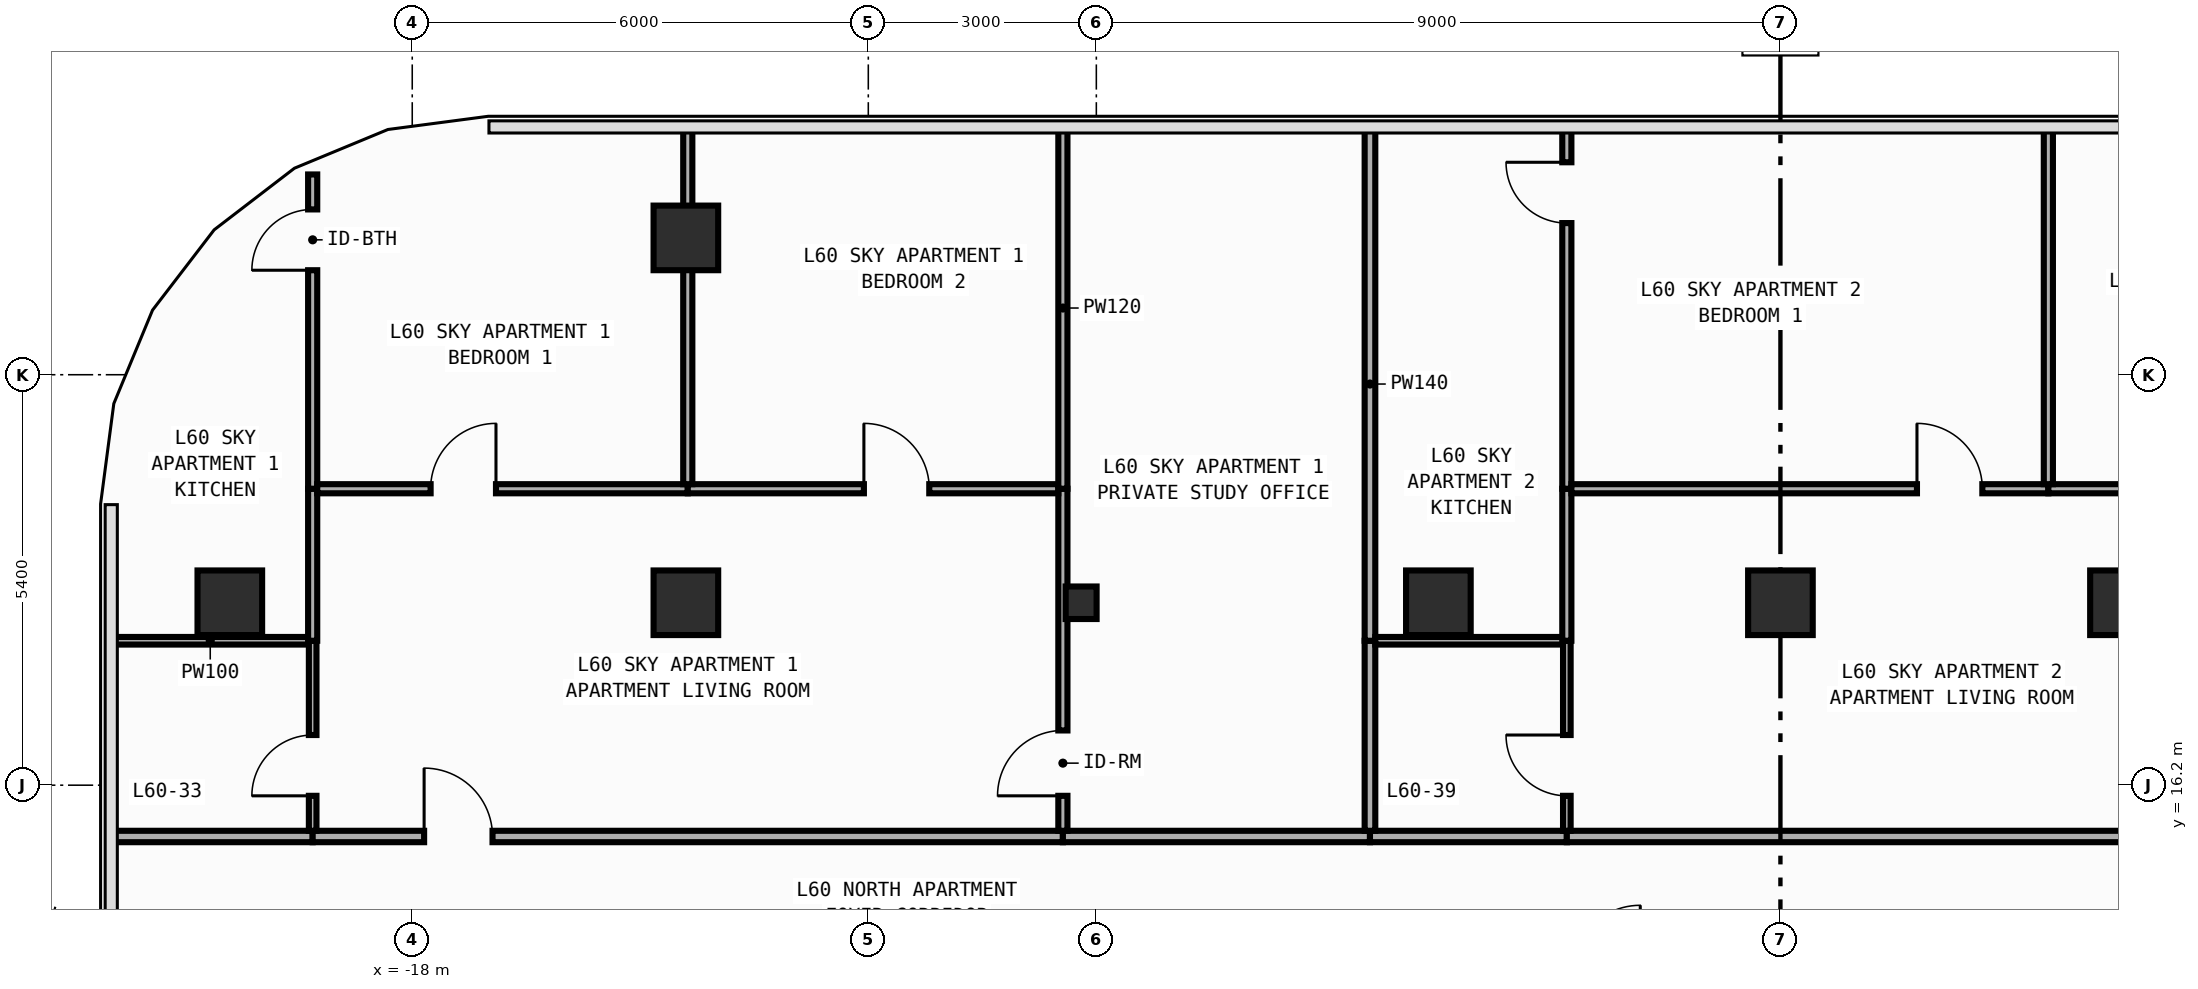
"""IFC4 building model, lengths in metres.
Left out: names, types, materials, properties, quantities, classifications, styles, units other than length and angle.
Written with IfcOpenShell. Run it as: python <this file> out.ifc"""

import sys

from ifc_helpers import new_model, si_unit, direction, frame, frame_2d, origin, origin_2d, place, context, subcontext, project, spatial, rectangle, i_section, extrude, element, fill, save


model = new_model("IFC4")
c1 = context("Model", 3, precision=1e-05, world=origin(), true_north=direction((0.0, 1.0)))
c2 = subcontext(c1, "Body", "Model", "MODEL_VIEW")
j1 = project(units=[si_unit("LENGTHUNIT", "METRE"), si_unit("PLANEANGLEUNIT", "RADIAN")], contexts=[c1])
p1 = place(None, origin())
s1 = spatial("IfcSite", under=j1, at=p1, CompositionType="ELEMENT")
p2 = place(p1, origin())
s2 = spatial("IfcBuilding", under=s1, at=p2, CompositionType="ELEMENT")
p3 = place(p2, frame((0.0, 0.0, 254.8)))
s3 = spatial("IfcBuildingStorey", under=s2, at=p3, CompositionType="ELEMENT", Elevation=254.8)
p4 = place(p3, frame((-9.2, 18.6, 0.0), z_axis=(0.0, 0.0, 1.0), x_axis=(1.0, 0.0, 0.0)))
e1 = element("IfcColumn", 1, at=p4, inside=s3, PredefinedType="COLUMN", context=c2, shape_type="SweptSolid", body=[
    extrude(i_section(OverallWidth=0.407, OverallDepth=0.428, WebThickness=0.02, FlangeThickness=0.035, FilletRadius=0.022, at=origin_2d()), origin(), (0.0, 0.0, 1.0), 3.6),
])
for number, where, z_axis, x_axis in (
    (2, (-20.4, 18.6, 0.0), (0.0, 0.0, 1.0), (1.0, 0.0, 0.0)),
    (3, (-14.4, 18.6, 0.0), (0.0, 0.0, 1.0), (1.0, 0.0, 0.0)),
    (4, (-4.5, 18.6, 0.0), (0.0, 0.0, 1.0), (1.0, 0.0, 0.0)),
    (5, (0.0, 18.6, 0.0), (0.0, 0.0, 1.0), (1.0, 0.0, 0.0)),
    (6, (4.5, 18.6, 0.0), (0.0, 0.0, 1.0), (1.0, 0.0, 0.0)),
    (7, (-14.4, 23.4, 0.0), (0.0, 0.0, 1.0), (1.0, 0.0, 0.0)),
):
    element("IfcColumn", number, at=place(p3, frame(where, z_axis=z_axis, x_axis=x_axis)), inside=s3, PredefinedType="COLUMN", context=c2, shape_type="SweptSolid", body=[
        extrude(rectangle(XDim=0.85, YDim=0.85, at=origin_2d()), origin(), (0.0, 0.0, 1.0), 3.6),
    ])
p5 = place(p3, frame((-21.955, 15.525, 0.0), z_axis=(0.0, 0.0, 1.0), x_axis=(1.0, 0.0, 0.0)))
e8 = element("IfcWall", 8, at=p5, inside=s3, PredefinedType="PARTITIONING", context=c2, shape_type="SweptSolid", body=[
    extrude(rectangle(XDim=2.645, YDim=0.15, at=frame_2d((1.323, 0.0))), origin(), (0.0, 0.0, 1.0), 3.34),
])
p6 = place(p3, frame((-19.31, 15.525, 0.0), z_axis=(0.0, 0.0, 1.0), x_axis=(1.0, 0.0, 0.0)))
e9 = element("IfcWall", 9, at=p6, inside=s3, PredefinedType="PARTITIONING", context=c2, shape_type="SweptSolid", body=[
    extrude(rectangle(XDim=9.87, YDim=0.15, at=frame_2d((4.935, 0.0))), origin(), (0.0, 0.0, 1.0), 3.34),
])
p7 = place(p6, frame((1.466, 0.0, 0.0)))
e10 = element("IfcOpeningElement", 10, at=p7, cuts=e9, PredefinedType="OPENING", context=c2, shape_type="SweptSolid", body=[
    extrude(rectangle(XDim=0.9, YDim=2.15, at=frame_2d((0.45, 1.075))), frame((0.0, 0.085, 0.0), z_axis=(0.0, -1.0, 0.0), x_axis=(1.0, 0.0, 0.0)), (0.0, 0.0, 1.0), 0.17),
])
p8 = place(p3, frame((-9.44, 15.525, 0.0), z_axis=(0.0, 0.0, 1.0), x_axis=(1.0, 0.0, 0.0)))
e11 = element("IfcWall", 11, at=p8, inside=s3, PredefinedType="PARTITIONING", context=c2, shape_type="SweptSolid", body=[
    extrude(rectangle(XDim=4.04, YDim=0.15, at=frame_2d((2.02, 0.0))), origin(), (0.0, 0.0, 1.0), 3.34),
])
p9 = place(p3, frame((-5.4, 15.525, 0.0), z_axis=(0.0, 0.0, 1.0), x_axis=(1.0, 0.0, 0.0)))
e12 = element("IfcWall", 12, at=p9, inside=s3, PredefinedType="PARTITIONING", context=c2, shape_type="SweptSolid", body=[
    extrude(rectangle(XDim=2.59, YDim=0.15, at=frame_2d((1.295, 0.0))), origin(), (0.0, 0.0, 1.0), 3.34),
])
p10 = place(p3, frame((-2.81, 15.525, 0.0), z_axis=(0.0, 0.0, 1.0), x_axis=(1.0, 0.0, 0.0)))
e13 = element("IfcWall", 13, at=p10, inside=s3, PredefinedType="PARTITIONING", context=c2, shape_type="SweptSolid", body=[
    extrude(rectangle(XDim=12.67, YDim=0.15, at=frame_2d((6.335, 0.0))), origin(), (0.0, 0.0, 1.0), 3.34),
])
p11 = place(p10, frame((9.301, 0.0, 0.0)))
e14 = element("IfcOpeningElement", 14, at=p11, cuts=e13, PredefinedType="OPENING", context=c2, shape_type="SweptSolid", body=[
    extrude(rectangle(XDim=0.9, YDim=2.15, at=frame_2d((0.45, 1.075))), frame((0.0, 0.085, 0.0), z_axis=(0.0, -1.0, 0.0), x_axis=(1.0, 0.0, 0.0)), (0.0, 0.0, 1.0), 0.17),
])
p12 = place(p3, frame((-21.955, 18.1, 0.0), z_axis=(0.0, 0.0, 1.0), x_axis=(1.0, 0.0, 0.0)))
e15 = element("IfcWall", 15, at=p12, inside=s3, PredefinedType="PARTITIONING", context=c2, shape_type="SweptSolid", body=[
    extrude(rectangle(XDim=2.595, YDim=0.1, at=frame_2d((1.297, 0.0))), origin(), (0.0, 0.0, 1.0), 3.34),
])
p13 = place(p3, frame((-19.31, 15.6, 0.0), z_axis=(0.0, 0.0, 1.0), x_axis=(0.0, 1.0, 0.0)))
e16 = element("IfcWall", 16, at=p13, inside=s3, PredefinedType="PARTITIONING", context=c2, shape_type="SweptSolid", body=[
    extrude(rectangle(XDim=2.5, YDim=0.1, at=frame_2d((1.25, 0.0))), origin(), (0.0, 0.0, 1.0), 3.34),
])
p14 = place(p13, frame((0.46, 0.0, 0.0)))
e17 = element("IfcOpeningElement", 17, at=p14, cuts=e16, PredefinedType="OPENING", context=c2, shape_type="SweptSolid", body=[
    extrude(rectangle(XDim=0.8, YDim=2.1, at=frame_2d((0.4, 1.05))), frame((0.0, 0.06, 0.0), z_axis=(0.0, -1.0, 0.0), x_axis=(1.0, 0.0, 0.0)), (0.0, 0.0, 1.0), 0.12),
])
p15 = place(p3, frame((-19.31, 18.1, 0.0), z_axis=(0.0, 0.0, 1.0), x_axis=(0.0, 1.0, 0.0)))
e18 = element("IfcWall", 18, at=p15, inside=s3, PredefinedType="PARTITIONING", context=c2, shape_type="SweptSolid", body=[
    extrude(rectangle(XDim=2.0, YDim=0.12, at=frame_2d((1.0, 0.0))), origin(), (0.0, 0.0, 1.0), 3.34),
])
p16 = place(p3, frame((-19.31, 20.1, 0.0), z_axis=(0.0, 0.0, 1.0), x_axis=(0.0, 1.0, 0.0)))
e19 = element("IfcWall", 19, at=p16, inside=s3, PredefinedType="PARTITIONING", context=c2, shape_type="SweptSolid", body=[
    extrude(rectangle(XDim=4.135, YDim=0.12, at=frame_2d((2.067, 0.0))), origin(), (0.0, 0.0, 1.0), 3.34),
])
p17 = place(p16, frame((2.875, 0.0, 0.0)))
e20 = element("IfcOpeningElement", 20, at=p17, cuts=e19, PredefinedType="OPENING", context=c2, shape_type="SweptSolid", body=[
    extrude(rectangle(XDim=0.8, YDim=2.1, at=frame_2d((0.4, 1.05))), frame((0.0, 0.07, 0.0), z_axis=(0.0, -1.0, 0.0), x_axis=(1.0, 0.0, 0.0)), (0.0, 0.0, 1.0), 0.14),
])
p18 = place(p3, frame((-9.44, 15.6, 0.0), z_axis=(0.0, 0.0, 1.0), x_axis=(0.0, 1.0, 0.0)))
e21 = element("IfcWall", 21, at=p18, inside=s3, PredefinedType="PARTITIONING", context=c2, shape_type="SweptSolid", body=[
    extrude(rectangle(XDim=4.5, YDim=0.12, at=frame_2d((2.25, 0.0))), origin(), (0.0, 0.0, 1.0), 2.44),
])
p19 = place(p18, frame((0.46, 0.0, 0.0)))
e22 = element("IfcOpeningElement", 22, at=p19, cuts=e21, PredefinedType="OPENING", context=c2, shape_type="SweptSolid", body=[
    extrude(rectangle(XDim=0.86, YDim=2.15, at=frame_2d((0.43, 1.075))), frame((0.0, 0.07, 0.0), z_axis=(0.0, -1.0, 0.0), x_axis=(1.0, 0.0, 0.0)), (0.0, 0.0, 1.0), 0.14),
])
p20 = place(p3, frame((-19.25, 20.1, 0.0), z_axis=(0.0, 0.0, 1.0), x_axis=(1.0, 0.0, 0.0)))
e23 = element("IfcWall", 23, at=p20, inside=s3, PredefinedType="PARTITIONING", context=c2, shape_type="SweptSolid", body=[
    extrude(rectangle(XDim=4.875, YDim=0.12, at=frame_2d((2.438, 0.0))), origin(), (0.0, 0.0, 1.0), 3.34),
])
p21 = place(p20, frame((1.492, 0.0, 0.0)))
e24 = element("IfcOpeningElement", 24, at=p21, cuts=e23, PredefinedType="OPENING", context=c2, shape_type="SweptSolid", body=[
    extrude(rectangle(XDim=0.86, YDim=2.15, at=frame_2d((0.43, 1.075))), frame((0.0, 0.07, 0.0), z_axis=(0.0, -1.0, 0.0), x_axis=(1.0, 0.0, 0.0)), (0.0, 0.0, 1.0), 0.14),
])
p22 = place(p3, frame((-14.375, 20.1, 0.0), z_axis=(0.0, 0.0, 1.0), x_axis=(1.0, 0.0, 0.0)))
e25 = element("IfcWall", 25, at=p22, inside=s3, PredefinedType="PARTITIONING", context=c2, shape_type="SweptSolid", body=[
    extrude(rectangle(XDim=4.875, YDim=0.12, at=frame_2d((2.438, 0.0))), origin(), (0.0, 0.0, 1.0), 3.34),
])
p23 = place(p22, frame((2.317, 0.0, 0.0)))
e26 = element("IfcOpeningElement", 26, at=p23, cuts=e25, PredefinedType="OPENING", context=c2, shape_type="SweptSolid", body=[
    extrude(rectangle(XDim=0.86, YDim=2.15, at=frame_2d((0.43, 1.075))), frame((0.0, 0.07, 0.0), z_axis=(0.0, -1.0, 0.0), x_axis=(1.0, 0.0, 0.0)), (0.0, 0.0, 1.0), 0.14),
])
p24 = place(p3, frame((-9.44, 20.1, 0.0), z_axis=(0.0, 0.0, 1.0), x_axis=(0.0, 1.0, 0.0)))
e27 = element("IfcWall", 27, at=p24, inside=s3, PredefinedType="PARTITIONING", context=c2, shape_type="SweptSolid", body=[
    extrude(rectangle(XDim=4.755, YDim=0.12, at=frame_2d((2.377, 0.0))), origin(), (0.0, 0.0, 1.0), 3.34),
])
p25 = place(p3, frame((-5.4, 15.6, 0.0), z_axis=(0.0, 0.0, 1.0), x_axis=(0.0, 1.0, 0.0)))
e28 = element("IfcWall", 28, at=p25, inside=s3, PredefinedType="PARTITIONING", context=c2, shape_type="SweptSolid", body=[
    extrude(rectangle(XDim=2.5, YDim=0.14, at=frame_2d((1.25, 0.0))), origin(), (0.0, 0.0, 1.0), 3.34),
])
p26 = place(p3, frame((-5.4, 18.1, 0.0), z_axis=(0.0, 0.0, 1.0), x_axis=(0.0, 1.0, 0.0)))
e29 = element("IfcWall", 29, at=p26, inside=s3, PredefinedType="PARTITIONING", context=c2, shape_type="SweptSolid", body=[
    extrude(rectangle(XDim=6.755, YDim=0.14, at=frame_2d((3.377, 0.0))), origin(), (0.0, 0.0, 1.0), 3.34),
])
p27 = place(p3, frame((-14.375, 20.16, 0.0), z_axis=(0.0, 0.0, 1.0), x_axis=(0.0, 1.0, 0.0)))
e30 = element("IfcWall", 30, at=p27, inside=s3, PredefinedType="PARTITIONING", context=c2, shape_type="SweptSolid", body=[
    extrude(rectangle(XDim=4.695, YDim=0.12, at=frame_2d((2.348, 0.0))), origin(), (0.0, 0.0, 1.0), 2.44),
])
p28 = place(p3, frame((-5.33, 18.1, 0.0), z_axis=(0.0, 0.0, 1.0), x_axis=(1.0, 0.0, 0.0)))
e31 = element("IfcWall", 31, at=p28, inside=s3, PredefinedType="PARTITIONING", context=c2, shape_type="SweptSolid", body=[
    extrude(rectangle(XDim=2.47, YDim=0.1, at=frame_2d((1.235, 0.0))), origin(), (0.0, 0.0, 1.0), 3.34),
])
p29 = place(p3, frame((-2.81, 15.6, 0.0), z_axis=(0.0, 0.0, 1.0), x_axis=(0.0, 1.0, 0.0)))
e32 = element("IfcWall", 32, at=p29, inside=s3, PredefinedType="PARTITIONING", context=c2, shape_type="SweptSolid", body=[
    extrude(rectangle(XDim=2.5, YDim=0.1, at=frame_2d((1.25, 0.0))), origin(), (0.0, 0.0, 1.0), 3.34),
])
p30 = place(p29, frame((0.46, 0.0, 0.0)))
e33 = element("IfcOpeningElement", 33, at=p30, cuts=e32, PredefinedType="OPENING", context=c2, shape_type="SweptSolid", body=[
    extrude(rectangle(XDim=0.8, YDim=2.1, at=frame_2d((0.4, 1.05))), frame((0.0, 0.06, 0.0), z_axis=(0.0, -1.0, 0.0), x_axis=(1.0, 0.0, 0.0)), (0.0, 0.0, 1.0), 0.12),
])
p31 = place(p3, frame((-2.81, 18.1, 0.0), z_axis=(0.0, 0.0, 1.0), x_axis=(0.0, 1.0, 0.0)))
e34 = element("IfcWall", 34, at=p31, inside=s3, PredefinedType="PARTITIONING", context=c2, shape_type="SweptSolid", body=[
    extrude(rectangle(XDim=2.0, YDim=0.12, at=frame_2d((1.0, 0.0))), origin(), (0.0, 0.0, 1.0), 3.34),
])
p32 = place(p3, frame((-2.81, 20.1, 0.0), z_axis=(0.0, 0.0, 1.0), x_axis=(0.0, 1.0, 0.0)))
e35 = element("IfcWall", 35, at=p32, inside=s3, PredefinedType="PARTITIONING", context=c2, shape_type="SweptSolid", body=[
    extrude(rectangle(XDim=4.755, YDim=0.12, at=frame_2d((2.377, 0.0))), origin(), (0.0, 0.0, 1.0), 3.34),
])
p33 = place(p32, frame((3.495, 0.0, 0.0)))
e36 = element("IfcOpeningElement", 36, at=p33, cuts=e35, PredefinedType="OPENING", context=c2, shape_type="SweptSolid", body=[
    extrude(rectangle(XDim=0.8, YDim=2.1, at=frame_2d((0.4, 1.05))), frame((0.0, 0.07, 0.0), z_axis=(0.0, -1.0, 0.0), x_axis=(1.0, 0.0, 0.0)), (0.0, 0.0, 1.0), 0.14),
])
p34 = place(p3, frame((-2.75, 20.1, 0.0), z_axis=(0.0, 0.0, 1.0), x_axis=(1.0, 0.0, 0.0)))
e37 = element("IfcWall", 37, at=p34, inside=s3, PredefinedType="PARTITIONING", context=c2, shape_type="SweptSolid", body=[
    extrude(rectangle(XDim=6.275, YDim=0.12, at=frame_2d((3.137, 0.0))), origin(), (0.0, 0.0, 1.0), 3.34),
])
p35 = place(p34, frame((4.546, 0.0, 0.0)))
e38 = element("IfcOpeningElement", 38, at=p35, cuts=e37, PredefinedType="OPENING", context=c2, shape_type="SweptSolid", body=[
    extrude(rectangle(XDim=0.86, YDim=2.15, at=frame_2d((0.43, 1.075))), frame((0.0, 0.07, 0.0), z_axis=(0.0, -1.0, 0.0), x_axis=(1.0, 0.0, 0.0)), (0.0, 0.0, 1.0), 0.14),
])
p36 = place(p3, frame((3.525, 20.1, 0.0), z_axis=(0.0, 0.0, 1.0), x_axis=(1.0, 0.0, 0.0)))
e39 = element("IfcWall", 39, at=p36, inside=s3, PredefinedType="PARTITIONING", context=c2, shape_type="SweptSolid", body=[
    extrude(rectangle(XDim=6.275, YDim=0.12, at=frame_2d((3.138, 0.0))), origin(), (0.0, 0.0, 1.0), 3.34),
])
p37 = place(p36, frame((3.116, 0.0, 0.0)))
e40 = element("IfcOpeningElement", 40, at=p37, cuts=e39, PredefinedType="OPENING", context=c2, shape_type="SweptSolid", body=[
    extrude(rectangle(XDim=0.86, YDim=2.15, at=frame_2d((0.43, 1.075))), frame((0.0, 0.07, 0.0), z_axis=(0.0, -1.0, 0.0), x_axis=(1.0, 0.0, 0.0)), (0.0, 0.0, 1.0), 0.14),
])
p38 = place(p3, frame((3.525, 20.16, 0.0), z_axis=(0.0, 0.0, 1.0), x_axis=(0.0, 1.0, 0.0)))
e41 = element("IfcWall", 41, at=p38, inside=s3, PredefinedType="PARTITIONING", context=c2, shape_type="SweptSolid", body=[
    extrude(rectangle(XDim=4.695, YDim=0.12, at=frame_2d((2.348, 0.0))), origin(), (0.0, 0.0, 1.0), 3.34),
])
p39 = place(p7, origin())
e42 = element("IfcDoor", 42, at=p39, inside=s3, OperationType="SINGLE_SWING_LEFT", PredefinedType="DOOR", context=c2, shape_type="SweptSolid", body=[
    extrude(rectangle(XDim=0.9, YDim=2.15, at=frame_2d((0.45, 1.075))), frame((0.0, 0.025, 0.0), z_axis=(0.0, -1.0, 0.0), x_axis=(1.0, 0.0, 0.0)), (0.0, 0.0, 1.0), 0.05),
])
fill(e10, e42)
p40 = place(p14, origin())
e43 = element("IfcDoor", 43, at=p40, inside=s3, OperationType="SINGLE_SWING_LEFT", PredefinedType="DOOR", context=c2, shape_type="SweptSolid", body=[
    extrude(rectangle(XDim=0.8, YDim=2.1, at=frame_2d((0.4, 1.05))), frame((0.0, 0.025, 0.0), z_axis=(0.0, -1.0, 0.0), x_axis=(1.0, 0.0, 0.0)), (0.0, 0.0, 1.0), 0.05),
])
fill(e17, e43)
p41 = place(p19, origin())
e44 = element("IfcDoor", 44, at=p41, inside=s3, OperationType="SINGLE_SWING_LEFT", PredefinedType="DOOR", context=c2, shape_type="SweptSolid", body=[
    extrude(rectangle(XDim=0.86, YDim=2.15, at=frame_2d((0.43, 1.075))), frame((0.0, 0.025, 0.0), z_axis=(0.0, -1.0, 0.0), x_axis=(1.0, 0.0, 0.0)), (0.0, 0.0, 1.0), 0.05),
])
fill(e22, e44)
p42 = place(p21, origin())
e45 = element("IfcDoor", 45, at=p42, inside=s3, OperationType="SINGLE_SWING_RIGHT", PredefinedType="DOOR", context=c2, shape_type="SweptSolid", body=[
    extrude(rectangle(XDim=0.86, YDim=2.15, at=frame_2d((0.43, 1.075))), frame((0.0, 0.025, 0.0), z_axis=(0.0, -1.0, 0.0), x_axis=(1.0, 0.0, 0.0)), (0.0, 0.0, 1.0), 0.05),
])
fill(e24, e45)
p43 = place(p23, origin())
e46 = element("IfcDoor", 46, at=p43, inside=s3, OperationType="SINGLE_SWING_LEFT", PredefinedType="DOOR", context=c2, shape_type="SweptSolid", body=[
    extrude(rectangle(XDim=0.86, YDim=2.15, at=frame_2d((0.43, 1.075))), frame((0.0, 0.025, 0.0), z_axis=(0.0, -1.0, 0.0), x_axis=(1.0, 0.0, 0.0)), (0.0, 0.0, 1.0), 0.05),
])
fill(e26, e46)
p44 = place(p30, origin())
e47 = element("IfcDoor", 47, at=p44, inside=s3, OperationType="SINGLE_SWING_RIGHT", PredefinedType="DOOR", context=c2, shape_type="SweptSolid", body=[
    extrude(rectangle(XDim=0.8, YDim=2.1, at=frame_2d((0.4, 1.05))), frame((0.0, 0.025, 0.0), z_axis=(0.0, -1.0, 0.0), x_axis=(1.0, 0.0, 0.0)), (0.0, 0.0, 1.0), 0.05),
])
fill(e33, e47)
p45 = place(p35, origin())
e48 = element("IfcDoor", 48, at=p45, inside=s3, OperationType="SINGLE_SWING_LEFT", PredefinedType="DOOR", context=c2, shape_type="SweptSolid", body=[
    extrude(rectangle(XDim=0.86, YDim=2.15, at=frame_2d((0.43, 1.075))), frame((0.0, 0.025, 0.0), z_axis=(0.0, -1.0, 0.0), x_axis=(1.0, 0.0, 0.0)), (0.0, 0.0, 1.0), 0.05),
])
fill(e38, e48)
p46 = place(p33, origin())
e49 = element("IfcDoor", 49, at=p46, inside=s3, OperationType="SINGLE_SWING_RIGHT", PredefinedType="DOOR", context=c2, shape_type="SweptSolid", body=[
    extrude(rectangle(XDim=0.8, YDim=2.1, at=frame_2d((0.4, 1.05))), frame((0.0, 0.025, 0.0), z_axis=(0.0, -1.0, 0.0), x_axis=(1.0, 0.0, 0.0)), (0.0, 0.0, 1.0), 0.05),
])
fill(e36, e49)
p47 = place(p17, origin())
e50 = element("IfcDoor", 50, at=p47, inside=s3, OperationType="SINGLE_SWING_LEFT", PredefinedType="DOOR", context=c2, shape_type="SweptSolid", body=[
    extrude(rectangle(XDim=0.8, YDim=2.1, at=frame_2d((0.4, 1.05))), frame((0.0, 0.025, 0.0), z_axis=(0.0, -1.0, 0.0), x_axis=(1.0, 0.0, 0.0)), (0.0, 0.0, 1.0), 0.05),
])
fill(e20, e50)
save(model, sys.argv[1])
